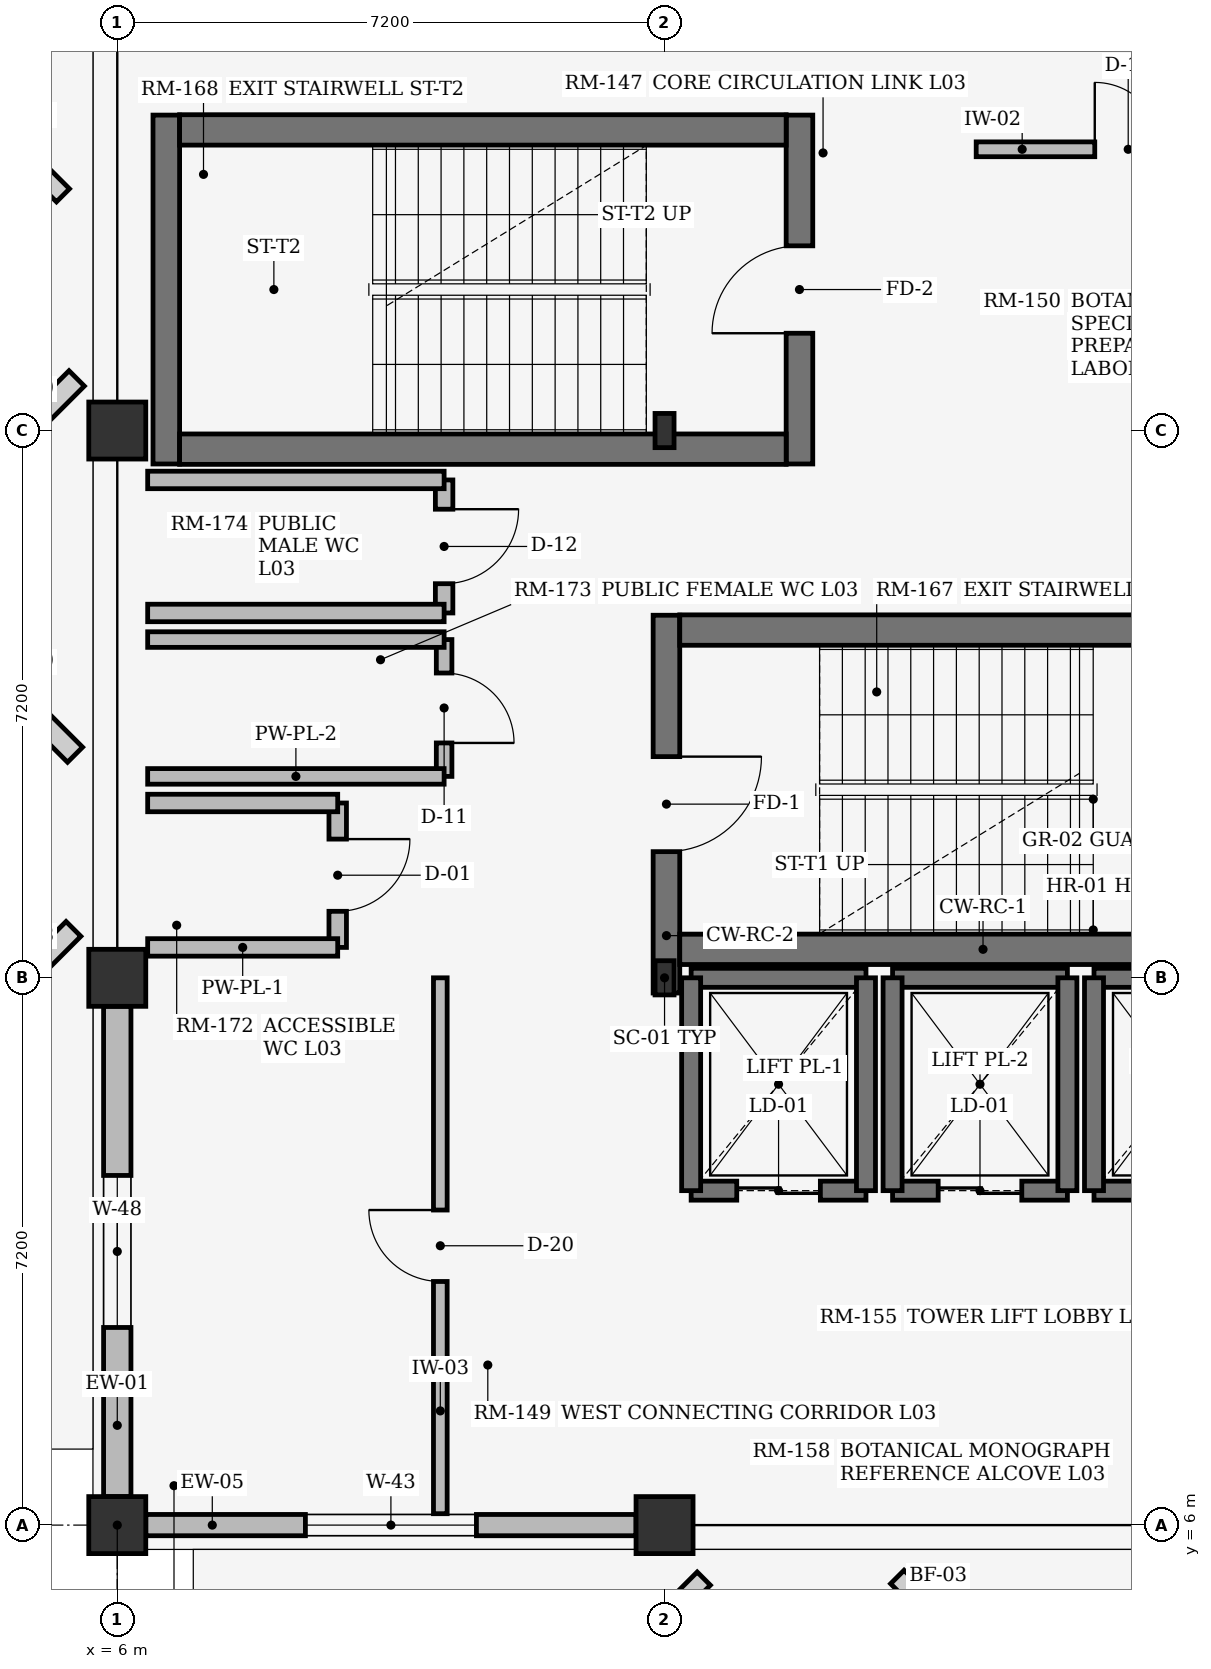
"""IFC4 building model, lengths in metres.
Left out: names, types, materials, properties, quantities, classifications, styles, units other than length and angle.
Written with IfcOpenShell. Run it as: python <this file> out.ifc"""

import sys

from ifc_helpers import new_model, si_unit, direction, frame, frame_2d, origin, origin_2d, place, context, subcontext, project, spatial, rectangle, i_section, extrude, element, fill, save


model = new_model("IFC4")
c1 = context("Model", 3, precision=1e-05, world=origin(), true_north=direction((0.0, 1.0)))
c2 = subcontext(c1, "Body", "Model", "MODEL_VIEW")
j1 = project(units=[si_unit("LENGTHUNIT", "METRE"), si_unit("PLANEANGLEUNIT", "RADIAN")], contexts=[c1])
p1 = place(None, origin())
s1 = spatial("IfcSite", under=j1, at=p1, CompositionType="ELEMENT")
p2 = place(p1, origin())
s2 = spatial("IfcBuilding", under=s1, at=p2, CompositionType="ELEMENT")
p3 = place(p2, frame((0.0, 0.0, 13.2)))
s3 = spatial("IfcBuildingStorey", under=s2, at=p3, CompositionType="ELEMENT", Elevation=13.2)
for number, where, z_axis, x_axis in (
    (1, (6.0, 6.0, 0.0), (0.0, 0.0, 1.0), (1.0, 0.0, 0.0)),
    (2, (6.0, 13.2, 0.0), (0.0, 0.0, 1.0), (1.0, 0.0, 0.0)),
    (3, (6.0, 20.4, 0.0), (0.0, 0.0, 1.0), (1.0, 0.0, 0.0)),
    (4, (13.2, 6.0, 0.0), (0.0, 0.0, 1.0), (1.0, 0.0, 0.0)),
):
    element("IfcColumn", number, at=place(p3, frame(where, z_axis=z_axis, x_axis=x_axis)), inside=s3, PredefinedType="COLUMN", context=c2, shape_type="SweptSolid", body=[
        extrude(rectangle(XDim=0.75, YDim=0.75, at=origin_2d()), origin(), (0.0, 0.0, 1.0), 3.635),
    ])
for number, where, z_axis, x_axis in (
    (5, (13.2, 13.2, 0.0), (0.0, 0.0, 1.0), (1.0, 0.0, 0.0)),
    (6, (13.2, 20.4, 0.0), (0.0, 0.0, 1.0), (1.0, 0.0, 0.0)),
):
    element("IfcColumn", number, at=place(p3, frame(where, z_axis=z_axis, x_axis=x_axis)), inside=s3, PredefinedType="COLUMN", context=c2, shape_type="SweptSolid", body=[
        extrude(i_section(OverallWidth=0.25, OverallDepth=0.45, WebThickness=0.011, FlangeThickness=0.014, at=origin_2d()), origin(), (0.0, 0.0, 1.0), 3.635),
    ])
p4 = place(p3, frame((6.375, 6.0, 0.0), z_axis=(0.0, 0.0, 1.0), x_axis=(1.0, 0.0, 0.0)))
e7 = element("IfcWall", 7, at=p4, inside=s3, PredefinedType="STANDARD", context=c2, shape_type="SweptSolid", body=[
    extrude(rectangle(XDim=6.45, YDim=0.28, at=frame_2d((3.225, 0.0))), origin(), (0.0, 0.0, 1.0), 3.015),
])
p5 = place(p4, frame((2.1, 0.0, 0.75)))
e8 = element("IfcOpeningElement", 8, at=p5, cuts=e7, PredefinedType="OPENING", context=c2, shape_type="SweptSolid", body=[
    extrude(rectangle(XDim=2.25, YDim=1.5, at=frame_2d((1.125, 0.75))), frame((0.0, 0.15, 0.0), z_axis=(0.0, -1.0, 0.0), x_axis=(1.0, 0.0, 0.0)), (0.0, 0.0, 1.0), 0.3),
])
p6 = place(p3, frame((6.0, 6.375, 0.0), z_axis=(0.0, 0.0, 1.0), x_axis=(0.0, 1.0, 0.0)))
e9 = element("IfcWall", 9, at=p6, inside=s3, PredefinedType="STANDARD", context=c2, shape_type="SweptSolid", body=[
    extrude(rectangle(XDim=6.45, YDim=0.36, at=frame_2d((3.225, 0.0))), origin(), (0.0, 0.0, 1.0), 3.015),
])
p7 = place(p6, frame((2.225, 0.0, 0.75)))
e10 = element("IfcOpeningElement", 10, at=p7, cuts=e9, PredefinedType="OPENING", context=c2, shape_type="SweptSolid", body=[
    extrude(rectangle(XDim=2.0, YDim=1.25, at=frame_2d((1.0, 0.625))), frame((0.0, 0.19, 0.0), z_axis=(0.0, -1.0, 0.0), x_axis=(1.0, 0.0, 0.0)), (0.0, 0.0, 1.0), 0.38),
])
p8 = place(p3, frame((13.225, 13.0, 0.0), z_axis=(0.0, 0.0, 1.0), x_axis=(0.0, 1.0, 0.0)))
e11 = element("IfcWall", 11, at=p8, inside=s3, PredefinedType="SHEAR", context=c2, shape_type="SweptSolid", body=[
    extrude(rectangle(XDim=4.97, YDim=0.35, at=frame_2d((2.485, 0.0))), origin(), (0.0, 0.0, 1.0), 3.635),
])
p9 = place(p8, frame((1.86, 0.0, 0.0)))
e12 = element("IfcOpeningElement", 12, at=p9, cuts=e11, PredefinedType="OPENING", context=c2, shape_type="SweptSolid", body=[
    extrude(rectangle(XDim=1.25, YDim=2.2, at=frame_2d((0.625, 1.1))), frame((0.0, 0.185, 0.0), z_axis=(0.0, -1.0, 0.0), x_axis=(1.0, 0.0, 0.0)), (0.0, 0.0, 1.0), 0.37),
])
for number, where, z_axis, x_axis in (
    (13, (13.4, 13.575, 0.0), (0.0, 0.0, 1.0), (1.0, 0.0, 0.0)),
    (14, (13.4, 17.775, 0.0), (0.0, 0.0, 1.0), (1.0, 0.0, 0.0)),
):
    element("IfcWall", number, at=place(p3, frame(where, z_axis=z_axis, x_axis=x_axis)), inside=s3, PredefinedType="SHEAR", context=c2, shape_type="SweptSolid", body=[
        extrude(rectangle(XDim=7.98, YDim=0.4, at=frame_2d((3.99, 0.0))), origin(), (0.0, 0.0, 1.0), 3.635),
    ])
p10 = place(p3, frame((14.975, 24.55, 0.0), z_axis=(0.0, 0.0, 1.0), x_axis=(0.0, -1.0, 0.0)))
e15 = element("IfcWall", 15, at=p10, inside=s3, PredefinedType="SHEAR", context=c2, shape_type="SweptSolid", body=[
    extrude(rectangle(XDim=4.59, YDim=0.35, at=frame_2d((2.295, 0.0))), origin(), (0.0, 0.0, 1.0), 3.635),
])
p11 = place(p10, frame((1.72, 0.0, 0.0)))
e16 = element("IfcOpeningElement", 16, at=p11, cuts=e15, PredefinedType="OPENING", context=c2, shape_type="SweptSolid", body=[
    extrude(rectangle(XDim=1.15, YDim=2.2, at=frame_2d((0.575, 1.1))), frame((0.0, 0.185, 0.0), z_axis=(0.0, -1.0, 0.0), x_axis=(1.0, 0.0, 0.0)), (0.0, 0.0, 1.0), 0.37),
])
p12 = place(p3, frame((6.645, 24.55, 0.0), z_axis=(0.0, 0.0, 1.0), x_axis=(0.0, -1.0, 0.0)))
e17 = element("IfcWall", 17, at=p12, inside=s3, PredefinedType="SHEAR", context=c2, shape_type="SweptSolid", body=[
    extrude(rectangle(XDim=4.59, YDim=0.35, at=frame_2d((2.295, 0.0))), origin(), (0.0, 0.0, 1.0), 3.635),
])
for number, where, z_axis, x_axis in (
    (18, (14.8, 24.355, 0.0), (0.0, 0.0, 1.0), (-1.0, 0.0, 0.0)),
    (19, (14.8, 20.155, 0.0), (0.0, 0.0, 1.0), (-1.0, 0.0, 0.0)),
):
    element("IfcWall", number, at=place(p3, frame(where, z_axis=z_axis, x_axis=x_axis)), inside=s3, PredefinedType="SHEAR", context=c2, shape_type="SweptSolid", body=[
        extrude(rectangle(XDim=7.98, YDim=0.4, at=frame_2d((3.99, 0.0))), origin(), (0.0, 0.0, 1.0), 3.635),
    ])
p13 = place(p3, frame((13.55, 10.4, 0.0), z_axis=(0.0, 0.0, 1.0), x_axis=(1.0, 0.0, 0.0)))
e20 = element("IfcWall", 20, at=p13, inside=s3, PredefinedType="SHEAR", context=c2, shape_type="SweptSolid", body=[
    extrude(rectangle(XDim=2.3, YDim=0.25, at=frame_2d((1.15, 0.0))), origin(), (0.0, 0.0, 1.0), 3.635),
])
p14 = place(p13, frame((0.6, 0.0, 0.0)))
e21 = element("IfcOpeningElement", 21, at=p14, cuts=e20, PredefinedType="OPENING", context=c2, shape_type="SweptSolid", body=[
    extrude(rectangle(XDim=1.1, YDim=2.2, at=frame_2d((0.55, 1.1))), frame((0.0, 0.135, 0.0), z_axis=(0.0, -1.0, 0.0), x_axis=(1.0, 0.0, 0.0)), (0.0, 0.0, 1.0), 0.27),
])
p15 = place(p3, frame((13.55, 13.2, 0.0), z_axis=(0.0, 0.0, 1.0), x_axis=(1.0, 0.0, 0.0)))
e22 = element("IfcWall", 22, at=p15, inside=s3, PredefinedType="SHEAR", context=c2, shape_type="SweptSolid", body=[
    extrude(rectangle(XDim=2.3, YDim=0.25, at=frame_2d((1.15, 0.0))), origin(), (0.0, 0.0, 1.0), 3.635),
])
for number, where, z_axis, x_axis in (
    (23, (13.55, 10.4, 0.0), (0.0, 0.0, 1.0), (0.0, 1.0, 0.0)),
    (24, (15.85, 10.4, 0.0), (0.0, 0.0, 1.0), (0.0, 1.0, 0.0)),
):
    element("IfcWall", number, at=place(p3, frame(where, z_axis=z_axis, x_axis=x_axis)), inside=s3, PredefinedType="SHEAR", context=c2, shape_type="SweptSolid", body=[
        extrude(rectangle(XDim=2.8, YDim=0.25, at=frame_2d((1.4, 0.0))), origin(), (0.0, 0.0, 1.0), 3.635),
    ])
p16 = place(p3, frame((16.2, 10.4, 0.0), z_axis=(0.0, 0.0, 1.0), x_axis=(1.0, 0.0, 0.0)))
e25 = element("IfcWall", 25, at=p16, inside=s3, PredefinedType="SHEAR", context=c2, shape_type="SweptSolid", body=[
    extrude(rectangle(XDim=2.3, YDim=0.25, at=frame_2d((1.15, 0.0))), origin(), (0.0, 0.0, 1.0), 3.635),
])
p17 = place(p16, frame((0.6, 0.0, 0.0)))
e26 = element("IfcOpeningElement", 26, at=p17, cuts=e25, PredefinedType="OPENING", context=c2, shape_type="SweptSolid", body=[
    extrude(rectangle(XDim=1.1, YDim=2.2, at=frame_2d((0.55, 1.1))), frame((0.0, 0.135, 0.0), z_axis=(0.0, -1.0, 0.0), x_axis=(1.0, 0.0, 0.0)), (0.0, 0.0, 1.0), 0.27),
])
p18 = place(p3, frame((16.2, 13.2, 0.0), z_axis=(0.0, 0.0, 1.0), x_axis=(1.0, 0.0, 0.0)))
e27 = element("IfcWall", 27, at=p18, inside=s3, PredefinedType="SHEAR", context=c2, shape_type="SweptSolid", body=[
    extrude(rectangle(XDim=2.3, YDim=0.25, at=frame_2d((1.15, 0.0))), origin(), (0.0, 0.0, 1.0), 3.635),
])
for number, where, z_axis, x_axis in (
    (28, (16.2, 10.4, 0.0), (0.0, 0.0, 1.0), (0.0, 1.0, 0.0)),
    (29, (18.5, 10.4, 0.0), (0.0, 0.0, 1.0), (0.0, 1.0, 0.0)),
):
    element("IfcWall", number, at=place(p3, frame(where, z_axis=z_axis, x_axis=x_axis)), inside=s3, PredefinedType="SHEAR", context=c2, shape_type="SweptSolid", body=[
        extrude(rectangle(XDim=2.8, YDim=0.25, at=frame_2d((1.4, 0.0))), origin(), (0.0, 0.0, 1.0), 3.635),
    ])
p19 = place(p3, frame((18.85, 10.4, 0.0), z_axis=(0.0, 0.0, 1.0), x_axis=(1.0, 0.0, 0.0)))
e30 = element("IfcWall", 30, at=p19, inside=s3, PredefinedType="SHEAR", context=c2, shape_type="SweptSolid", body=[
    extrude(rectangle(XDim=2.3, YDim=0.25, at=frame_2d((1.15, 0.0))), origin(), (0.0, 0.0, 1.0), 3.635),
])
p20 = place(p19, frame((0.6, 0.0, 0.0)))
e31 = element("IfcOpeningElement", 31, at=p20, cuts=e30, PredefinedType="OPENING", context=c2, shape_type="SweptSolid", body=[
    extrude(rectangle(XDim=1.1, YDim=2.2, at=frame_2d((0.55, 1.1))), frame((0.0, 0.135, 0.0), z_axis=(0.0, -1.0, 0.0), x_axis=(1.0, 0.0, 0.0)), (0.0, 0.0, 1.0), 0.27),
])
p21 = place(p3, frame((18.85, 13.2, 0.0), z_axis=(0.0, 0.0, 1.0), x_axis=(1.0, 0.0, 0.0)))
e32 = element("IfcWall", 32, at=p21, inside=s3, PredefinedType="SHEAR", context=c2, shape_type="SweptSolid", body=[
    extrude(rectangle(XDim=2.3, YDim=0.25, at=frame_2d((1.15, 0.0))), origin(), (0.0, 0.0, 1.0), 3.635),
])
p22 = place(p3, frame((18.85, 10.4, 0.0), z_axis=(0.0, 0.0, 1.0), x_axis=(0.0, 1.0, 0.0)))
e33 = element("IfcWall", 33, at=p22, inside=s3, PredefinedType="SHEAR", context=c2, shape_type="SweptSolid", body=[
    extrude(rectangle(XDim=2.8, YDim=0.25, at=frame_2d((1.4, 0.0))), origin(), (0.0, 0.0, 1.0), 3.635),
])
p23 = place(p3, frame((8.9, 13.6, 0.0), z_axis=(0.0, 0.0, 1.0), x_axis=(0.0, 1.0, 0.0)))
e34 = element("IfcWall", 34, at=p23, inside=s3, PredefinedType="PLUMBINGWALL", context=c2, shape_type="SweptSolid", body=[
    extrude(rectangle(XDim=1.9, YDim=0.23, at=frame_2d((0.95, 0.0))), origin(), (0.0, 0.0, 1.0), 3.615),
])
p24 = place(p23, frame((0.475, 0.0, 0.0)))
e35 = element("IfcOpeningElement", 35, at=p24, cuts=e34, PredefinedType="OPENING", context=c2, shape_type="SweptSolid", body=[
    extrude(rectangle(XDim=0.95, YDim=2.15, at=frame_2d((0.475, 1.075))), frame((0.0, 0.125, 0.0), z_axis=(0.0, -1.0, 0.0), x_axis=(1.0, 0.0, 0.0)), (0.0, 0.0, 1.0), 0.25),
])
for number, where, z_axis, x_axis in (
    (36, (6.4, 13.6, 0.0), (0.0, 0.0, 1.0), (1.0, 0.0, 0.0)),
    (37, (6.4, 15.5, 0.0), (0.0, 0.0, 1.0), (1.0, 0.0, 0.0)),
):
    element("IfcWall", number, at=place(p3, frame(where, z_axis=z_axis, x_axis=x_axis)), inside=s3, PredefinedType="PLUMBINGWALL", context=c2, shape_type="SweptSolid", body=[
        extrude(rectangle(XDim=2.5, YDim=0.23, at=frame_2d((1.25, 0.0))), origin(), (0.0, 0.0, 1.0), 3.615),
    ])
p25 = place(p3, frame((10.3, 15.85, 0.0), z_axis=(0.0, 0.0, 1.0), x_axis=(0.0, 1.0, 0.0)))
e38 = element("IfcWall", 38, at=p25, inside=s3, PredefinedType="PLUMBINGWALL", context=c2, shape_type="SweptSolid", body=[
    extrude(rectangle(XDim=1.8, YDim=0.205, at=frame_2d((0.9, 0.0))), origin(), (0.0, 0.0, 1.0), 3.615),
])
p26 = place(p25, frame((0.44, 0.0, 0.0)))
e39 = element("IfcOpeningElement", 39, at=p26, cuts=e38, PredefinedType="OPENING", context=c2, shape_type="SweptSolid", body=[
    extrude(rectangle(XDim=0.92, YDim=2.1, at=frame_2d((0.46, 1.05))), frame((0.0, 0.113, 0.0), z_axis=(0.0, -1.0, 0.0), x_axis=(1.0, 0.0, 0.0)), (0.0, 0.0, 1.0), 0.225),
])
for number, where, z_axis, x_axis in (
    (40, (6.4, 15.85, 0.0), (0.0, 0.0, 1.0), (1.0, 0.0, 0.0)),
    (41, (6.4, 17.65, 0.0), (0.0, 0.0, 1.0), (1.0, 0.0, 0.0)),
):
    element("IfcWall", number, at=place(p3, frame(where, z_axis=z_axis, x_axis=x_axis)), inside=s3, PredefinedType="PLUMBINGWALL", context=c2, shape_type="SweptSolid", body=[
        extrude(rectangle(XDim=3.9, YDim=0.205, at=frame_2d((1.95, 0.0))), origin(), (0.0, 0.0, 1.0), 3.615),
    ])
p27 = place(p3, frame((10.3, 18.0, 0.0), z_axis=(0.0, 0.0, 1.0), x_axis=(0.0, 1.0, 0.0)))
e42 = element("IfcWall", 42, at=p27, inside=s3, PredefinedType="PLUMBINGWALL", context=c2, shape_type="SweptSolid", body=[
    extrude(rectangle(XDim=1.75, YDim=0.23, at=frame_2d((0.875, 0.0))), origin(), (0.0, 0.0, 1.0), 3.615),
])
p28 = place(p27, frame((0.385, 0.0, 0.0)))
e43 = element("IfcOpeningElement", 43, at=p28, cuts=e42, PredefinedType="OPENING", context=c2, shape_type="SweptSolid", body=[
    extrude(rectangle(XDim=0.98, YDim=2.1, at=frame_2d((0.49, 1.05))), frame((0.0, 0.125, 0.0), z_axis=(0.0, -1.0, 0.0), x_axis=(1.0, 0.0, 0.0)), (0.0, 0.0, 1.0), 0.25),
])
for number, where, z_axis, x_axis in (
    (44, (6.4, 18.0, 0.0), (0.0, 0.0, 1.0), (1.0, 0.0, 0.0)),
    (45, (6.4, 19.75, 0.0), (0.0, 0.0, 1.0), (1.0, 0.0, 0.0)),
):
    element("IfcWall", number, at=place(p3, frame(where, z_axis=z_axis, x_axis=x_axis)), inside=s3, PredefinedType="PLUMBINGWALL", context=c2, shape_type="SweptSolid", body=[
        extrude(rectangle(XDim=3.9, YDim=0.23, at=frame_2d((1.95, 0.0))), origin(), (0.0, 0.0, 1.0), 3.615),
    ])
p29 = place(p3, frame((17.3, 24.1, 0.0), z_axis=(0.0, 0.0, 1.0), x_axis=(1.0, 0.0, 0.0)))
e46 = element("IfcWall", 46, at=p29, inside=s3, PredefinedType="PARTITIONING", context=c2, shape_type="SweptSolid", body=[
    extrude(rectangle(XDim=4.0, YDim=0.195, at=frame_2d((2.0, 0.0))), origin(), (0.0, 0.0, 1.0), 3.615),
])
p30 = place(p29, frame((1.56, 0.0, 0.0)))
e47 = element("IfcOpeningElement", 47, at=p30, cuts=e46, PredefinedType="OPENING", context=c2, shape_type="SweptSolid", body=[
    extrude(rectangle(XDim=0.88, YDim=2.12, at=frame_2d((0.44, 1.06))), frame((0.0, 0.107, 0.0), z_axis=(0.0, -1.0, 0.0), x_axis=(1.0, 0.0, 0.0)), (0.0, 0.0, 1.0), 0.215),
])
p31 = place(p3, frame((10.25, 6.15, 0.0), z_axis=(0.0, 0.0, 1.0), x_axis=(0.0, 1.0, 0.0)))
e48 = element("IfcWall", 48, at=p31, inside=s3, PredefinedType="PARTITIONING", context=c2, shape_type="SweptSolid", body=[
    extrude(rectangle(XDim=7.05, YDim=0.18, at=frame_2d((3.525, 0.0))), origin(), (0.0, 0.0, 1.0), 3.615),
])
p32 = place(p31, frame((3.055, 0.0, 0.0)))
e49 = element("IfcOpeningElement", 49, at=p32, cuts=e48, PredefinedType="OPENING", context=c2, shape_type="SweptSolid", body=[
    extrude(rectangle(XDim=0.94, YDim=2.18, at=frame_2d((0.47, 1.09))), frame((0.0, 0.1, 0.0), z_axis=(0.0, -1.0, 0.0), x_axis=(1.0, 0.0, 0.0)), (0.0, 0.0, 1.0), 0.2),
])
p33 = place(p5, origin())
e50 = element("IfcWindow", 50, at=p33, inside=s3, PartitioningType="SINGLE_PANEL", PredefinedType="WINDOW", context=c2, shape_type="SweptSolid", body=[
    extrude(rectangle(XDim=2.25, YDim=1.5, at=frame_2d((1.125, 0.75))), frame((0.0, 0.03, 0.0), z_axis=(0.0, -1.0, 0.0), x_axis=(1.0, 0.0, 0.0)), (0.0, 0.0, 1.0), 0.06),
])
fill(e8, e50)
p34 = place(p7, origin())
e51 = element("IfcWindow", 51, at=p34, inside=s3, PartitioningType="SINGLE_PANEL", PredefinedType="WINDOW", context=c2, shape_type="SweptSolid", body=[
    extrude(rectangle(XDim=2.0, YDim=1.25, at=frame_2d((1.0, 0.625))), frame((0.0, 0.03, 0.0), z_axis=(0.0, -1.0, 0.0), x_axis=(1.0, 0.0, 0.0)), (0.0, 0.0, 1.0), 0.06),
])
fill(e10, e51)
p35 = place(p9, origin())
e52 = element("IfcDoor", 52, at=p35, inside=s3, OperationType="SINGLE_SWING_RIGHT", PredefinedType="DOOR", context=c2, shape_type="SweptSolid", body=[
    extrude(rectangle(XDim=1.25, YDim=2.2, at=frame_2d((0.625, 1.1))), frame((0.0, 0.025, 0.0), z_axis=(0.0, -1.0, 0.0), x_axis=(1.0, 0.0, 0.0)), (0.0, 0.0, 1.0), 0.05),
])
fill(e12, e52)
p36 = place(p11, origin())
e53 = element("IfcDoor", 53, at=p36, inside=s3, OperationType="SINGLE_SWING_RIGHT", PredefinedType="DOOR", context=c2, shape_type="SweptSolid", body=[
    extrude(rectangle(XDim=1.15, YDim=2.2, at=frame_2d((0.575, 1.1))), frame((0.0, 0.025, 0.0), z_axis=(0.0, -1.0, 0.0), x_axis=(1.0, 0.0, 0.0)), (0.0, 0.0, 1.0), 0.05),
])
fill(e16, e53)
p37 = place(p14, origin())
e54 = element("IfcDoor", 54, at=p37, inside=s3, OperationType="DOUBLE_DOOR_SLIDING", PredefinedType="DOOR", context=c2, shape_type="SweptSolid", body=[
    extrude(rectangle(XDim=1.1, YDim=2.2, at=frame_2d((0.55, 1.1))), frame((0.0, 0.025, 0.0), z_axis=(0.0, -1.0, 0.0), x_axis=(1.0, 0.0, 0.0)), (0.0, 0.0, 1.0), 0.05),
])
fill(e21, e54)
p38 = place(p17, origin())
e55 = element("IfcDoor", 55, at=p38, inside=s3, OperationType="DOUBLE_DOOR_SLIDING", PredefinedType="DOOR", context=c2, shape_type="SweptSolid", body=[
    extrude(rectangle(XDim=1.1, YDim=2.2, at=frame_2d((0.55, 1.1))), frame((0.0, 0.025, 0.0), z_axis=(0.0, -1.0, 0.0), x_axis=(1.0, 0.0, 0.0)), (0.0, 0.0, 1.0), 0.05),
])
fill(e26, e55)
p39 = place(p24, origin())
e56 = element("IfcDoor", 56, at=p39, inside=s3, OperationType="SINGLE_SWING_RIGHT", PredefinedType="DOOR", context=c2, shape_type="SweptSolid", body=[
    extrude(rectangle(XDim=0.95, YDim=2.15, at=frame_2d((0.475, 1.075))), frame((0.0, 0.025, 0.0), z_axis=(0.0, -1.0, 0.0), x_axis=(1.0, 0.0, 0.0)), (0.0, 0.0, 1.0), 0.05),
])
fill(e35, e56)
p40 = place(p26, frame((0.92, 0.0, 0.0), z_axis=(0.0, 0.0, 1.0), x_axis=(-1.0, 0.0, 0.0)))
e57 = element("IfcDoor", 57, at=p40, inside=s3, OperationType="SINGLE_SWING_LEFT", PredefinedType="DOOR", context=c2, shape_type="SweptSolid", body=[
    extrude(rectangle(XDim=0.92, YDim=2.1, at=frame_2d((0.46, 1.05))), frame((0.0, 0.025, 0.0), z_axis=(0.0, -1.0, 0.0), x_axis=(1.0, 0.0, 0.0)), (0.0, 0.0, 1.0), 0.05),
])
fill(e39, e57)
p41 = place(p28, origin())
e58 = element("IfcDoor", 58, at=p41, inside=s3, OperationType="SINGLE_SWING_RIGHT", PredefinedType="DOOR", context=c2, shape_type="SweptSolid", body=[
    extrude(rectangle(XDim=0.98, YDim=2.1, at=frame_2d((0.49, 1.05))), frame((0.0, 0.025, 0.0), z_axis=(0.0, -1.0, 0.0), x_axis=(1.0, 0.0, 0.0)), (0.0, 0.0, 1.0), 0.05),
])
fill(e43, e58)
p42 = place(p30, origin())
e59 = element("IfcDoor", 59, at=p42, inside=s3, OperationType="SINGLE_SWING_LEFT", PredefinedType="DOOR", context=c2, shape_type="SweptSolid", body=[
    extrude(rectangle(XDim=0.88, YDim=2.12, at=frame_2d((0.44, 1.06))), frame((0.0, 0.025, 0.0), z_axis=(0.0, -1.0, 0.0), x_axis=(1.0, 0.0, 0.0)), (0.0, 0.0, 1.0), 0.05),
])
fill(e47, e59)
p43 = place(p32, frame((0.94, 0.0, 0.0), z_axis=(0.0, 0.0, 1.0), x_axis=(-1.0, 0.0, 0.0)))
e60 = element("IfcDoor", 60, at=p43, inside=s3, OperationType="SINGLE_SWING_RIGHT", PredefinedType="DOOR", context=c2, shape_type="SweptSolid", body=[
    extrude(rectangle(XDim=0.94, YDim=2.18, at=frame_2d((0.47, 1.09))), frame((0.0, 0.025, 0.0), z_axis=(0.0, -1.0, 0.0), x_axis=(1.0, 0.0, 0.0)), (0.0, 0.0, 1.0), 0.05),
])
fill(e49, e60)
save(model, sys.argv[1])
